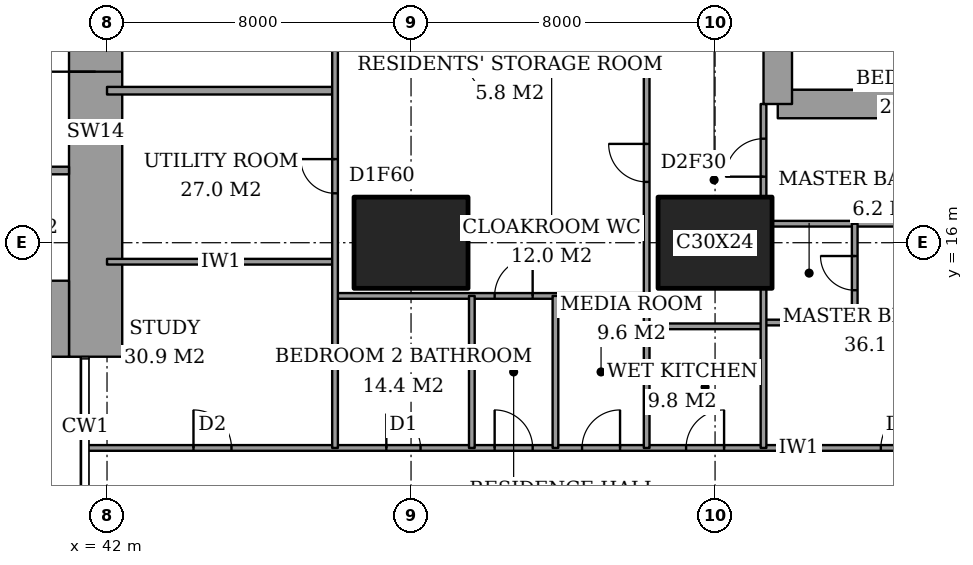
"""IFC4 building model, lengths in metres.
Left out: names, types, materials, properties, quantities, classifications, styles, units other than length and angle.
Written with IfcOpenShell. Run it as: python <this file> out.ifc"""

import sys

from ifc_helpers import new_model, si_unit, direction, frame, frame_2d, origin, origin_2d, place, context, subcontext, project, spatial, rectangle, extrude, element, fill, save


model = new_model("IFC4")
c1 = context("Model", 3, precision=1e-05, world=origin(), true_north=direction((0.0, 1.0)))
c2 = subcontext(c1, "Body", "Model", "MODEL_VIEW")
j1 = project(units=[si_unit("LENGTHUNIT", "METRE"), si_unit("PLANEANGLEUNIT", "RADIAN")], contexts=[c1])
p1 = place(None, origin())
s1 = spatial("IfcSite", under=j1, at=p1, CompositionType="ELEMENT")
p2 = place(p1, origin())
s2 = spatial("IfcBuilding", under=s1, at=p2, CompositionType="ELEMENT")
p3 = place(p2, frame((0.0, 0.0, 29.6)))
s3 = spatial("IfcBuildingStorey", under=s2, at=p3, CompositionType="ELEMENT", Elevation=29.6)
for number, where, z_axis, x_axis in (
    (1, (50.0, 16.0, 0.0), (0.0, 0.0, 1.0), (1.0, 0.0, 0.0)),
    (2, (58.0, 16.0, 0.0), (0.0, 0.0, 1.0), (1.0, 0.0, 0.0)),
):
    element("IfcColumn", number, at=place(p3, frame(where, z_axis=z_axis, x_axis=x_axis)), inside=s3, PredefinedType="COLUMN", context=c2, shape_type="SweptSolid", body=[
        extrude(rectangle(XDim=3.0, YDim=2.4, at=origin_2d()), origin(), (0.0, 0.0, 1.0), 3.6),
    ])
p4 = place(p3, frame((37.85, 14.0, 0.0), z_axis=(0.0, 0.0, 1.0), x_axis=(1.0, 0.0, 0.0)))
e3 = element("IfcWall", 3, at=p4, inside=s3, PredefinedType="SHEAR", context=c2, shape_type="SweptSolid", body=[
    extrude(rectangle(XDim=3.15, YDim=2.0, at=frame_2d((1.575, 0.0))), origin(), (0.0, 0.0, 1.0), 3.6),
])
p5 = place(p3, frame((41.7, 13.0, 0.0), z_axis=(0.0, 0.0, 1.0), x_axis=(0.0, 1.0, 0.0)))
e4 = element("IfcWall", 4, at=p5, inside=s3, PredefinedType="SHEAR", context=c2, shape_type="SweptSolid", body=[
    extrude(rectangle(XDim=11.85, YDim=1.4, at=frame_2d((5.925, 0.0))), origin(), (0.0, 0.0, 1.0), 3.6),
])
p6 = place(p5, frame((7.5, 0.0, 0.0)))
e5 = element("IfcOpeningElement", 5, at=p6, cuts=e4, PredefinedType="OPENING", context=c2, shape_type="SweptSolid", body=[
    extrude(rectangle(XDim=1.8, YDim=2.4, at=frame_2d((0.9, 1.2))), frame((0.0, 0.71, 0.0), z_axis=(0.0, -1.0, 0.0), x_axis=(1.0, 0.0, 0.0)), (0.0, 0.0, 1.0), 1.42),
])
p7 = place(p3, frame((59.65, 19.65, 0.0), z_axis=(0.0, 0.0, 1.0), x_axis=(1.0, 0.0, 0.0)))
e6 = element("IfcWall", 6, at=p7, inside=s3, PredefinedType="SHEAR", context=c2, shape_type="SweptSolid", body=[
    extrude(rectangle(XDim=4.45, YDim=0.75, at=frame_2d((2.225, 0.0))), origin(), (0.0, 0.0, 1.0), 3.6),
])
p8 = place(p3, frame((59.65, 28.35, 0.0), z_axis=(0.0, 0.0, 1.0), x_axis=(0.0, -1.0, 0.0)))
e7 = element("IfcWall", 7, at=p8, inside=s3, PredefinedType="SHEAR", context=c2, shape_type="SweptSolid", body=[
    extrude(rectangle(XDim=8.7, YDim=0.75, at=frame_2d((4.35, 0.0))), origin(), (0.0, 0.0, 1.0), 3.6),
])
p9 = place(p8, frame((0.975, 0.0, 0.0)))
e8 = element("IfcOpeningElement", 8, at=p9, cuts=e7, PredefinedType="OPENING", context=c2, shape_type="SweptSolid", body=[
    extrude(rectangle(XDim=1.0, YDim=2.1, at=frame_2d((0.5, 1.05))), frame((0.0, 0.385, 0.0), z_axis=(0.0, -1.0, 0.0), x_axis=(1.0, 0.0, 0.0)), (0.0, 0.0, 1.0), 0.77),
])
p10 = place(p3, frame((41.439, 10.6, 0.0), z_axis=(0.0, 0.0, 1.0), x_axis=(1.0, 0.0, 0.0)))
e9 = element("IfcWall", 9, at=p10, inside=s3, PredefinedType="PARTITIONING", context=c2, shape_type="SweptSolid", body=[
    extrude(rectangle(XDim=25.011, YDim=0.15, at=frame_2d((12.505, 0.0))), origin(), (0.0, 0.0, 1.0), 3.35),
])
p11 = place(p10, frame((10.761, 0.0, 0.0)))
e10 = element("IfcOpeningElement", 10, at=p11, cuts=e9, PredefinedType="OPENING", context=c2, shape_type="SweptSolid", body=[
    extrude(rectangle(XDim=1.0, YDim=2.1, at=frame_2d((0.5, 1.05))), frame((0.0, 0.085, 0.0), z_axis=(0.0, -1.0, 0.0), x_axis=(1.0, 0.0, 0.0)), (0.0, 0.0, 1.0), 0.17),
])
p12 = place(p10, frame((20.924, 0.0, 0.0)))
e11 = element("IfcOpeningElement", 11, at=p12, cuts=e9, PredefinedType="OPENING", context=c2, shape_type="SweptSolid", body=[
    extrude(rectangle(XDim=1.0, YDim=2.1, at=frame_2d((0.5, 1.05))), frame((0.0, 0.085, 0.0), z_axis=(0.0, -1.0, 0.0), x_axis=(1.0, 0.0, 0.0)), (0.0, 0.0, 1.0), 0.17),
])
p13 = place(p10, frame((15.799, 0.0, 0.0)))
e12 = element("IfcOpeningElement", 12, at=p13, cuts=e9, PredefinedType="OPENING", context=c2, shape_type="SweptSolid", body=[
    extrude(rectangle(XDim=1.0, YDim=2.1, at=frame_2d((0.5, 1.05))), frame((0.0, 0.085, 0.0), z_axis=(0.0, -1.0, 0.0), x_axis=(1.0, 0.0, 0.0)), (0.0, 0.0, 1.0), 0.17),
])
p14 = place(p10, frame((13.061, 0.0, 0.0)))
e13 = element("IfcOpeningElement", 13, at=p14, cuts=e9, PredefinedType="OPENING", context=c2, shape_type="SweptSolid", body=[
    extrude(rectangle(XDim=1.0, YDim=2.1, at=frame_2d((0.5, 1.05))), frame((0.0, 0.085, 0.0), z_axis=(0.0, -1.0, 0.0), x_axis=(1.0, 0.0, 0.0)), (0.0, 0.0, 1.0), 0.17),
])
p15 = place(p10, frame((7.911, 0.0, 0.0)))
e14 = element("IfcOpeningElement", 14, at=p15, cuts=e9, PredefinedType="OPENING", context=c2, shape_type="SweptSolid", body=[
    extrude(rectangle(XDim=0.9, YDim=2.1, at=frame_2d((0.45, 1.05))), frame((0.0, 0.085, 0.0), z_axis=(0.0, -1.0, 0.0), x_axis=(1.0, 0.0, 0.0)), (0.0, 0.0, 1.0), 0.17),
])
p16 = place(p10, frame((2.836, 0.0, 0.0)))
e15 = element("IfcOpeningElement", 15, at=p16, cuts=e9, PredefinedType="OPENING", context=c2, shape_type="SweptSolid", body=[
    extrude(rectangle(XDim=1.0, YDim=2.1, at=frame_2d((0.5, 1.05))), frame((0.0, 0.085, 0.0), z_axis=(0.0, -1.0, 0.0), x_axis=(1.0, 0.0, 0.0)), (0.0, 0.0, 1.0), 0.17),
])
p17 = place(p3, frame((56.2, 13.8, 0.0), z_axis=(0.0, 0.0, 1.0), x_axis=(1.0, 0.0, 0.0)))
e16 = element("IfcWall", 16, at=p17, inside=s3, PredefinedType="PARTITIONING", context=c2, shape_type="SweptSolid", body=[
    extrude(rectangle(XDim=3.075, YDim=0.15, at=frame_2d((1.538, 0.0))), origin(), (0.0, 0.0, 1.0), 3.35),
])
p18 = place(p3, frame((59.275, 13.9, 0.0), z_axis=(0.0, 0.0, 1.0), x_axis=(1.0, 0.0, 0.0)))
e17 = element("IfcWall", 17, at=p18, inside=s3, PredefinedType="PARTITIONING", context=c2, shape_type="SweptSolid", body=[
    extrude(rectangle(XDim=2.4, YDim=0.15, at=frame_2d((1.2, 0.0))), origin(), (0.0, 0.0, 1.0), 3.35),
])
p19 = place(p3, frame((48.0, 14.6, 0.0), z_axis=(0.0, 0.0, 1.0), x_axis=(1.0, 0.0, 0.0)))
e18 = element("IfcWall", 18, at=p19, inside=s3, PredefinedType="PARTITIONING", context=c2, shape_type="SweptSolid", body=[
    extrude(rectangle(XDim=8.2, YDim=0.15, at=frame_2d((4.1, 0.0))), origin(), (0.0, 0.0, 1.0), 3.35),
])
p20 = place(p19, frame((4.2, 0.0, 0.0)))
e19 = element("IfcOpeningElement", 19, at=p20, cuts=e18, PredefinedType="OPENING", context=c2, shape_type="SweptSolid", body=[
    extrude(rectangle(XDim=1.0, YDim=2.1, at=frame_2d((0.5, 1.05))), frame((0.0, 0.085, 0.0), z_axis=(0.0, -1.0, 0.0), x_axis=(1.0, 0.0, 0.0)), (0.0, 0.0, 1.0), 0.17),
])
p21 = place(p3, frame((42.0, 15.5, 0.0), z_axis=(0.0, 0.0, 1.0), x_axis=(1.0, 0.0, 0.0)))
e20 = element("IfcWall", 20, at=p21, inside=s3, PredefinedType="PARTITIONING", context=c2, shape_type="SweptSolid", body=[
    extrude(rectangle(XDim=6.0, YDim=0.15, at=frame_2d((3.0, 0.0))), origin(), (0.0, 0.0, 1.0), 3.35),
])
p22 = place(p3, frame((59.5, 16.5, 0.0), z_axis=(0.0, 0.0, 1.0), x_axis=(1.0, 0.0, 0.0)))
e21 = element("IfcWall", 21, at=p22, inside=s3, PredefinedType="PARTITIONING", context=c2, shape_type="SweptSolid", body=[
    extrude(rectangle(XDim=5.15, YDim=0.15, at=frame_2d((2.575, 0.0))), origin(), (0.0, 0.0, 1.0), 3.35),
])
p23 = place(p3, frame((42.0, 20.0, 0.0), z_axis=(0.0, 0.0, 1.0), x_axis=(1.0, 0.0, 0.0)))
e22 = element("IfcWall", 22, at=p23, inside=s3, PredefinedType="PARTITIONING", context=c2, shape_type="SweptSolid", body=[
    extrude(rectangle(XDim=6.0, YDim=0.2, at=frame_2d((3.0, 0.0))), origin(), (0.0, 0.0, 1.0), 3.35),
])
p24 = place(p3, frame((48.0, 10.6, 0.0), z_axis=(0.0, 0.0, 1.0), x_axis=(0.0, 1.0, 0.0)))
e23 = element("IfcWall", 23, at=p24, inside=s3, PredefinedType="PARTITIONING", context=c2, shape_type="SweptSolid", body=[
    extrude(rectangle(XDim=13.4, YDim=0.15, at=frame_2d((6.7, 0.0))), origin(), (0.0, 0.0, 1.0), 3.35),
])
p25 = place(p24, frame((10.8, 0.0, 0.0)))
e24 = element("IfcOpeningElement", 24, at=p25, cuts=e23, PredefinedType="OPENING", context=c2, shape_type="SweptSolid", body=[
    extrude(rectangle(XDim=1.2, YDim=2.4, at=frame_2d((0.6, 1.2))), frame((0.0, 0.085, 0.0), z_axis=(0.0, -1.0, 0.0), x_axis=(1.0, 0.0, 0.0)), (0.0, 0.0, 1.0), 0.17),
])
p26 = place(p24, frame((6.7, 0.0, 0.0)))
e25 = element("IfcOpeningElement", 25, at=p26, cuts=e23, PredefinedType="OPENING", context=c2, shape_type="SweptSolid", body=[
    extrude(rectangle(XDim=0.9, YDim=2.1, at=frame_2d((0.45, 1.05))), frame((0.0, 0.085, 0.0), z_axis=(0.0, -1.0, 0.0), x_axis=(1.0, 0.0, 0.0)), (0.0, 0.0, 1.0), 0.17),
])
for number, where, z_axis, x_axis in (
    (26, (51.6, 10.6, 0.0), (0.0, 0.0, 1.0), (0.0, 1.0, 0.0)),
    (27, (53.8, 10.6, 0.0), (0.0, 0.0, 1.0), (0.0, 1.0, 0.0)),
):
    element("IfcWall", number, at=place(p3, frame(where, z_axis=z_axis, x_axis=x_axis)), inside=s3, PredefinedType="PARTITIONING", context=c2, shape_type="SweptSolid", body=[
        extrude(rectangle(XDim=4.0, YDim=0.15, at=frame_2d((2.0, 0.0))), origin(), (0.0, 0.0, 1.0), 3.35),
    ])
p27 = place(p3, frame((56.2, 10.6, 0.0), z_axis=(0.0, 0.0, 1.0), x_axis=(0.0, 1.0, 0.0)))
e28 = element("IfcWall", 28, at=p27, inside=s3, PredefinedType="PARTITIONING", context=c2, shape_type="SweptSolid", body=[
    extrude(rectangle(XDim=11.0, YDim=0.15, at=frame_2d((5.5, 0.0))), origin(), (0.0, 0.0, 1.0), 3.35),
])
p28 = place(p27, frame((7.0, 0.0, 0.0)))
e29 = element("IfcOpeningElement", 29, at=p28, cuts=e28, PredefinedType="OPENING", context=c2, shape_type="SweptSolid", body=[
    extrude(rectangle(XDim=1.0, YDim=2.1, at=frame_2d((0.5, 1.05))), frame((0.0, 0.085, 0.0), z_axis=(0.0, -1.0, 0.0), x_axis=(1.0, 0.0, 0.0)), (0.0, 0.0, 1.0), 0.17),
])
p29 = place(p3, frame((59.275, 10.6, 0.0), z_axis=(0.0, 0.0, 1.0), x_axis=(0.0, 1.0, 0.0)))
e30 = element("IfcWall", 30, at=p29, inside=s3, PredefinedType="PARTITIONING", context=c2, shape_type="SweptSolid", body=[
    extrude(rectangle(XDim=4.2, YDim=0.15, at=frame_2d((2.1, 0.0))), origin(), (0.0, 0.0, 1.0), 3.35),
])
p30 = place(p3, frame((59.275, 17.2, 0.0), z_axis=(0.0, 0.0, 1.0), x_axis=(0.0, 1.0, 0.0)))
e31 = element("IfcWall", 31, at=p30, inside=s3, PredefinedType="PARTITIONING", context=c2, shape_type="SweptSolid", body=[
    extrude(rectangle(XDim=2.45, YDim=0.15, at=frame_2d((1.225, 0.0))), origin(), (0.0, 0.0, 1.0), 3.35),
])
p31 = place(p30, frame((0.538, 0.0, 0.0)))
e32 = element("IfcOpeningElement", 32, at=p31, cuts=e31, PredefinedType="OPENING", context=c2, shape_type="SweptSolid", body=[
    extrude(rectangle(XDim=1.0, YDim=2.1, at=frame_2d((0.5, 1.05))), frame((0.0, 0.085, 0.0), z_axis=(0.0, -1.0, 0.0), x_axis=(1.0, 0.0, 0.0)), (0.0, 0.0, 1.0), 0.17),
])
p32 = place(p3, frame((61.675, 13.9, 0.0), z_axis=(0.0, 0.0, 1.0), x_axis=(0.0, 1.0, 0.0)))
e33 = element("IfcWall", 33, at=p32, inside=s3, PredefinedType="PARTITIONING", context=c2, shape_type="SweptSolid", body=[
    extrude(rectangle(XDim=2.6, YDim=0.15, at=frame_2d((1.3, 0.0))), origin(), (0.0, 0.0, 1.0), 3.35),
])
p33 = place(p32, frame((0.85, 0.0, 0.0)))
e34 = element("IfcOpeningElement", 34, at=p33, cuts=e33, PredefinedType="OPENING", context=c2, shape_type="SweptSolid", body=[
    extrude(rectangle(XDim=0.9, YDim=2.1, at=frame_2d((0.45, 1.05))), frame((0.0, 0.085, 0.0), z_axis=(0.0, -1.0, 0.0), x_axis=(1.0, 0.0, 0.0)), (0.0, 0.0, 1.0), 0.17),
])
p34 = place(p3, frame((28.3, 17.9, 0.0), z_axis=(0.0, 0.0, 1.0), x_axis=(1.0, 0.0, 0.0)))
e35 = element("IfcWall", 35, at=p34, inside=s3, PredefinedType="PARTITIONING", context=c2, shape_type="SweptSolid", body=[
    extrude(rectangle(XDim=12.7, YDim=0.2, at=frame_2d((6.35, 0.0))), origin(), (0.0, 0.0, 1.0), 3.6),
])
p35 = place(p34, frame((0.95, 0.0, 0.0)))
e36 = element("IfcOpeningElement", 36, at=p35, cuts=e35, PredefinedType="OPENING", context=c2, shape_type="SweptSolid", body=[
    extrude(rectangle(XDim=1.1, YDim=2.1, at=frame_2d((0.55, 1.05))), frame((0.0, 0.11, 0.0), z_axis=(0.0, -1.0, 0.0), x_axis=(1.0, 0.0, 0.0)), (0.0, 0.0, 1.0), 0.22),
])
p36 = place(p34, frame((4.15, 0.0, 0.0)))
e37 = element("IfcOpeningElement", 37, at=p36, cuts=e35, PredefinedType="OPENING", context=c2, shape_type="SweptSolid", body=[
    extrude(rectangle(XDim=1.1, YDim=2.1, at=frame_2d((0.55, 1.05))), frame((0.0, 0.11, 0.0), z_axis=(0.0, -1.0, 0.0), x_axis=(1.0, 0.0, 0.0)), (0.0, 0.0, 1.0), 0.22),
])
p37 = place(p34, frame((7.35, 0.0, 0.0)))
e38 = element("IfcOpeningElement", 38, at=p37, cuts=e35, PredefinedType="OPENING", context=c2, shape_type="SweptSolid", body=[
    extrude(rectangle(XDim=1.1, YDim=2.1, at=frame_2d((0.55, 1.05))), frame((0.0, 0.11, 0.0), z_axis=(0.0, -1.0, 0.0), x_axis=(1.0, 0.0, 0.0)), (0.0, 0.0, 1.0), 0.22),
])
p38 = place(p34, frame((10.6, 0.0, 0.0)))
e39 = element("IfcOpeningElement", 39, at=p38, cuts=e35, PredefinedType="OPENING", context=c2, shape_type="SweptSolid", body=[
    extrude(rectangle(XDim=1.2, YDim=2.1, at=frame_2d((0.6, 1.05))), frame((0.0, 0.11, 0.0), z_axis=(0.0, -1.0, 0.0), x_axis=(1.0, 0.0, 0.0)), (0.0, 0.0, 1.0), 0.22),
])
p39 = place(p11, origin())
e40 = element("IfcDoor", 40, at=p39, inside=s3, OperationType="SINGLE_SWING_RIGHT", PredefinedType="DOOR", context=c2, shape_type="SweptSolid", body=[
    extrude(rectangle(XDim=1.0, YDim=2.1, at=frame_2d((0.5, 1.05))), frame((0.0, 0.025, 0.0), z_axis=(0.0, -1.0, 0.0), x_axis=(1.0, 0.0, 0.0)), (0.0, 0.0, 1.0), 0.05),
])
fill(e10, e40)
p40 = place(p33, origin())
e41 = element("IfcDoor", 41, at=p40, inside=s3, OperationType="SINGLE_SWING_LEFT", PredefinedType="DOOR", context=c2, shape_type="SweptSolid", body=[
    extrude(rectangle(XDim=0.9, YDim=2.1, at=frame_2d((0.45, 1.05))), frame((0.0, 0.025, 0.0), z_axis=(0.0, -1.0, 0.0), x_axis=(1.0, 0.0, 0.0)), (0.0, 0.0, 1.0), 0.05),
])
fill(e34, e41)
p41 = place(p12, origin())
e42 = element("IfcDoor", 42, at=p41, inside=s3, OperationType="SINGLE_SWING_LEFT", PredefinedType="DOOR", context=c2, shape_type="SweptSolid", body=[
    extrude(rectangle(XDim=1.0, YDim=2.1, at=frame_2d((0.5, 1.05))), frame((0.0, 0.025, 0.0), z_axis=(0.0, -1.0, 0.0), x_axis=(1.0, 0.0, 0.0)), (0.0, 0.0, 1.0), 0.05),
])
fill(e11, e42)
p42 = place(p31, origin())
e43 = element("IfcDoor", 43, at=p42, inside=s3, OperationType="SINGLE_SWING_RIGHT", PredefinedType="DOOR", context=c2, shape_type="SweptSolid", body=[
    extrude(rectangle(XDim=1.0, YDim=2.1, at=frame_2d((0.5, 1.05))), frame((0.0, 0.025, 0.0), z_axis=(0.0, -1.0, 0.0), x_axis=(1.0, 0.0, 0.0)), (0.0, 0.0, 1.0), 0.05),
])
fill(e32, e43)
p43 = place(p13, origin())
e44 = element("IfcDoor", 44, at=p43, inside=s3, OperationType="SINGLE_SWING_LEFT", PredefinedType="DOOR", context=c2, shape_type="SweptSolid", body=[
    extrude(rectangle(XDim=1.0, YDim=2.1, at=frame_2d((0.5, 1.05))), frame((0.0, 0.025, 0.0), z_axis=(0.0, -1.0, 0.0), x_axis=(1.0, 0.0, 0.0)), (0.0, 0.0, 1.0), 0.05),
])
fill(e12, e44)
p44 = place(p28, origin())
e45 = element("IfcDoor", 45, at=p44, inside=s3, OperationType="SINGLE_SWING_LEFT", PredefinedType="DOOR", context=c2, shape_type="SweptSolid", body=[
    extrude(rectangle(XDim=1.0, YDim=2.1, at=frame_2d((0.5, 1.05))), frame((0.0, 0.025, 0.0), z_axis=(0.0, -1.0, 0.0), x_axis=(1.0, 0.0, 0.0)), (0.0, 0.0, 1.0), 0.05),
])
fill(e29, e45)
p45 = place(p14, origin())
e46 = element("IfcDoor", 46, at=p45, inside=s3, OperationType="SINGLE_SWING_LEFT", PredefinedType="DOOR", context=c2, shape_type="SweptSolid", body=[
    extrude(rectangle(XDim=1.0, YDim=2.1, at=frame_2d((0.5, 1.05))), frame((0.0, 0.025, 0.0), z_axis=(0.0, -1.0, 0.0), x_axis=(1.0, 0.0, 0.0)), (0.0, 0.0, 1.0), 0.05),
])
fill(e13, e46)
p46 = place(p20, origin())
e47 = element("IfcDoor", 47, at=p46, inside=s3, OperationType="SINGLE_SWING_LEFT", PredefinedType="DOOR", context=c2, shape_type="SweptSolid", body=[
    extrude(rectangle(XDim=1.0, YDim=2.1, at=frame_2d((0.5, 1.05))), frame((0.0, 0.025, 0.0), z_axis=(0.0, -1.0, 0.0), x_axis=(1.0, 0.0, 0.0)), (0.0, 0.0, 1.0), 0.05),
])
fill(e19, e47)
p47 = place(p15, origin())
e48 = element("IfcDoor", 48, at=p47, inside=s3, OperationType="SINGLE_SWING_RIGHT", PredefinedType="DOOR", context=c2, shape_type="SweptSolid", body=[
    extrude(rectangle(XDim=0.9, YDim=2.1, at=frame_2d((0.45, 1.05))), frame((0.0, 0.025, 0.0), z_axis=(0.0, -1.0, 0.0), x_axis=(1.0, 0.0, 0.0)), (0.0, 0.0, 1.0), 0.05),
])
fill(e14, e48)
p48 = place(p16, origin())
e49 = element("IfcDoor", 49, at=p48, inside=s3, OperationType="SINGLE_SWING_RIGHT", PredefinedType="DOOR", context=c2, shape_type="SweptSolid", body=[
    extrude(rectangle(XDim=1.0, YDim=2.1, at=frame_2d((0.5, 1.05))), frame((0.0, 0.025, 0.0), z_axis=(0.0, -1.0, 0.0), x_axis=(1.0, 0.0, 0.0)), (0.0, 0.0, 1.0), 0.05),
])
fill(e15, e49)
p49 = place(p26, origin())
e50 = element("IfcDoor", 50, at=p49, inside=s3, OperationType="SINGLE_SWING_LEFT", PredefinedType="DOOR", context=c2, shape_type="SweptSolid", body=[
    extrude(rectangle(XDim=0.9, YDim=2.1, at=frame_2d((0.45, 1.05))), frame((0.0, 0.025, 0.0), z_axis=(0.0, -1.0, 0.0), x_axis=(1.0, 0.0, 0.0)), (0.0, 0.0, 1.0), 0.05),
])
fill(e25, e50)
p50 = place(p6, origin())
e51 = element("IfcDoor", 51, at=p50, inside=s3, OperationType="DOUBLE_DOOR_DOUBLE_SWING", PredefinedType="DOOR", context=c2, shape_type="SweptSolid", body=[
    extrude(rectangle(XDim=1.8, YDim=2.4, at=frame_2d((0.9, 1.2))), frame((0.0, 0.025, 0.0), z_axis=(0.0, -1.0, 0.0), x_axis=(1.0, 0.0, 0.0)), (0.0, 0.0, 1.0), 0.05),
])
fill(e5, e51)
save(model, sys.argv[1])
